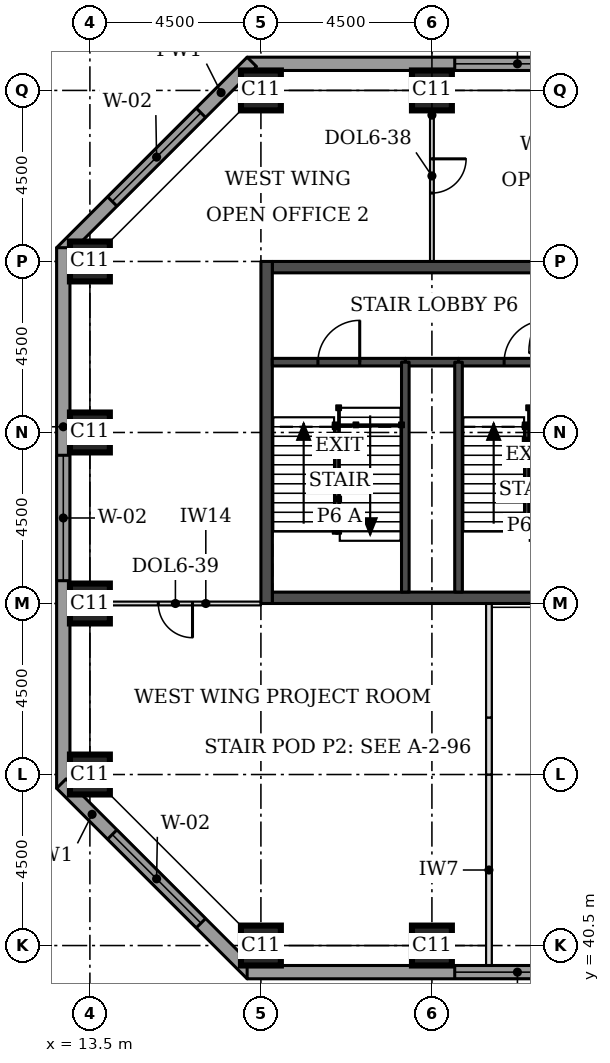
"""IFC4 building model, lengths in metres.
Left out: names, types, materials, properties, quantities, classifications, styles, units other than length and angle.
Written with IfcOpenShell. Run it as: python <this file> out.ifc"""

import sys

from ifc_helpers import new_model, si_unit, direction, frame, frame_2d, origin, origin_2d, place, context, subcontext, project, spatial, rectangle, extrude, element, fill, save


model = new_model("IFC4")
c1 = context("Model", 3, precision=1e-05, world=origin(), true_north=direction((0.0, 1.0)))
c2 = subcontext(c1, "Body", "Model", "MODEL_VIEW")
j1 = project(units=[si_unit("LENGTHUNIT", "METRE"), si_unit("PLANEANGLEUNIT", "RADIAN")], contexts=[c1])
p1 = place(None, origin())
s1 = spatial("IfcSite", under=j1, at=p1, CompositionType="ELEMENT")
p2 = place(p1, origin())
s2 = spatial("IfcBuilding", under=s1, at=p2, CompositionType="ELEMENT")
p3 = place(p2, frame((0.0, 0.0, 115.9)))
s3 = spatial("IfcBuildingStorey", under=s2, at=p3, CompositionType="ELEMENT", Elevation=115.9)
for number, where, z_axis, x_axis in (
    (1, (18.0, 40.5, 0.0), (0.0, 0.0, 1.0), (1.0, 0.0, 0.0)),
    (2, (22.5, 40.5, 0.0), (0.0, 0.0, 1.0), (1.0, 0.0, 0.0)),
    (3, (13.5, 45.0, 0.0), (0.0, 0.0, 1.0), (1.0, 0.0, 0.0)),
    (4, (13.5, 49.5, 0.0), (0.0, 0.0, 1.0), (1.0, 0.0, 0.0)),
    (5, (13.5, 54.0, 0.0), (0.0, 0.0, 1.0), (1.0, 0.0, 0.0)),
    (6, (13.5, 58.5, 0.0), (0.0, 0.0, 1.0), (1.0, 0.0, 0.0)),
    (7, (18.0, 63.0, 0.0), (0.0, 0.0, 1.0), (1.0, 0.0, 0.0)),
    (8, (22.5, 63.0, 0.0), (0.0, 0.0, 1.0), (1.0, 0.0, 0.0)),
):
    element("IfcColumn", number, at=place(p3, frame(where, z_axis=z_axis, x_axis=x_axis)), inside=s3, PredefinedType="COLUMN", context=c2, shape_type="SweptSolid", body=[
        extrude(rectangle(XDim=1.05, YDim=1.05, at=origin_2d()), origin(), (0.0, 0.0, 1.0), 3.7),
    ])
for number, where, z_axis, x_axis in (
    (9, (18.3, 49.65, 0.0), (0.0, 0.0, 1.0), (1.0, 0.0, 0.0)),
    (10, (18.3, 58.35, 0.0), (0.0, 0.0, 1.0), (1.0, 0.0, 0.0)),
):
    element("IfcWall", number, at=place(p3, frame(where, z_axis=z_axis, x_axis=x_axis)), inside=s3, PredefinedType="SHEAR", context=c2, shape_type="SweptSolid", body=[
        extrude(rectangle(XDim=8.4, YDim=0.3, at=frame_2d((4.2, 0.0))), origin(), (0.0, 0.0, 1.0), 3.7),
    ])
p4 = place(p3, frame((18.15, 49.5, 0.0), z_axis=(0.0, 0.0, 1.0), x_axis=(0.0, 1.0, 0.0)))
e11 = element("IfcWall", 11, at=p4, inside=s3, PredefinedType="SHEAR", context=c2, shape_type="SweptSolid", body=[
    extrude(rectangle(XDim=9.0, YDim=0.3, at=frame_2d((4.5, 0.0))), origin(), (0.0, 0.0, 1.0), 3.7),
])
p5 = place(p3, frame((35.475, 63.7, 0.0), z_axis=(0.0, 0.0, 1.0), x_axis=(-1.0, 0.0, 0.0)))
e12 = element("IfcWall", 12, at=p5, inside=s3, PredefinedType="STANDARD", context=c2, shape_type="SweptSolid", body=[
    extrude(rectangle(XDim=17.837, YDim=0.35, at=frame_2d((8.919, 0.0))), origin(), (0.0, 0.0, 1.0), 3.525),
])
p6 = place(p5, frame((0.5, 0.0, 0.9)))
e13 = element("IfcOpeningElement", 13, at=p6, cuts=e12, PredefinedType="OPENING", context=c2, shape_type="SweptSolid", body=[
    extrude(rectangle(XDim=3.3, YDim=1.9, at=frame_2d((1.65, 0.95))), frame((0.0, 0.185, 0.0), z_axis=(0.0, -1.0, 0.0), x_axis=(1.0, 0.0, 0.0)), (0.0, 0.0, 1.0), 0.37),
])
p7 = place(p5, frame((9.075, 0.0, 0.9)))
e14 = element("IfcOpeningElement", 14, at=p7, cuts=e12, PredefinedType="OPENING", context=c2, shape_type="SweptSolid", body=[
    extrude(rectangle(XDim=3.3, YDim=1.9, at=frame_2d((1.65, 0.95))), frame((0.0, 0.185, 0.0), z_axis=(0.0, -1.0, 0.0), x_axis=(1.0, 0.0, 0.0)), (0.0, 0.0, 1.0), 0.37),
])
p8 = place(p3, frame((17.761, 63.751, 0.0), z_axis=(0.0, 0.0, 1.0), x_axis=(-0.707106781187, -0.707106781187, 0.0)))
e15 = element("IfcWall", 15, at=p8, inside=s3, PredefinedType="STANDARD", context=c2, shape_type="SweptSolid", body=[
    extrude(rectangle(XDim=7.089, YDim=0.35, at=frame_2d((3.544, 0.0))), origin(), (0.0, 0.0, 1.0), 3.525),
])
p9 = place(p8, frame((1.894, 0.0, 0.9)))
e16 = element("IfcOpeningElement", 16, at=p9, cuts=e15, PredefinedType="OPENING", context=c2, shape_type="SweptSolid", body=[
    extrude(rectangle(XDim=3.3, YDim=1.9, at=frame_2d((1.65, 0.95))), frame((0.0, 0.185, 0.0), z_axis=(0.0, -1.0, 0.0), x_axis=(1.0, 0.0, 0.0)), (0.0, 0.0, 1.0), 0.37),
])
p10 = place(p3, frame((12.8, 58.862, 0.0), z_axis=(0.0, 0.0, 1.0), x_axis=(0.0, -1.0, 0.0)))
e17 = element("IfcWall", 17, at=p10, inside=s3, PredefinedType="STANDARD", context=c2, shape_type="SweptSolid", body=[
    extrude(rectangle(XDim=14.225, YDim=0.35, at=frame_2d((7.112, 0.0))), origin(), (0.0, 0.0, 1.0), 3.525),
])
p11 = place(p10, frame((5.462, 0.0, 0.9)))
e18 = element("IfcOpeningElement", 18, at=p11, cuts=e17, PredefinedType="OPENING", context=c2, shape_type="SweptSolid", body=[
    extrude(rectangle(XDim=3.3, YDim=1.9, at=frame_2d((1.65, 0.95))), frame((0.0, 0.185, 0.0), z_axis=(0.0, -1.0, 0.0), x_axis=(1.0, 0.0, 0.0)), (0.0, 0.0, 1.0), 0.37),
])
p12 = place(p3, frame((12.749, 44.761, 0.0), z_axis=(0.0, 0.0, 1.0), x_axis=(0.707106781187, -0.707106781187, 0.0)))
e19 = element("IfcWall", 19, at=p12, inside=s3, PredefinedType="STANDARD", context=c2, shape_type="SweptSolid", body=[
    extrude(rectangle(XDim=7.089, YDim=0.35, at=frame_2d((3.544, 0.0))), origin(), (0.0, 0.0, 1.0), 3.525),
])
p13 = place(p12, frame((1.894, 0.0, 0.9)))
e20 = element("IfcOpeningElement", 20, at=p13, cuts=e19, PredefinedType="OPENING", context=c2, shape_type="SweptSolid", body=[
    extrude(rectangle(XDim=3.3, YDim=1.9, at=frame_2d((1.65, 0.95))), frame((0.0, 0.185, 0.0), z_axis=(0.0, -1.0, 0.0), x_axis=(1.0, 0.0, 0.0)), (0.0, 0.0, 1.0), 0.37),
])
p14 = place(p3, frame((17.638, 39.8, 0.0), z_axis=(0.0, 0.0, 1.0), x_axis=(1.0, 0.0, 0.0)))
e21 = element("IfcWall", 21, at=p14, inside=s3, PredefinedType="STANDARD", context=c2, shape_type="SweptSolid", body=[
    extrude(rectangle(XDim=17.837, YDim=0.35, at=frame_2d((8.919, 0.0))), origin(), (0.0, 0.0, 1.0), 3.525),
])
p15 = place(p14, frame((5.462, 0.0, 0.9)))
e22 = element("IfcOpeningElement", 22, at=p15, cuts=e21, PredefinedType="OPENING", context=c2, shape_type="SweptSolid", body=[
    extrude(rectangle(XDim=3.3, YDim=1.9, at=frame_2d((1.65, 0.95))), frame((0.0, 0.185, 0.0), z_axis=(0.0, -1.0, 0.0), x_axis=(1.0, 0.0, 0.0)), (0.0, 0.0, 1.0), 0.37),
])
p16 = place(p14, frame((14.037, 0.0, 0.9)))
e23 = element("IfcOpeningElement", 23, at=p16, cuts=e21, PredefinedType="OPENING", context=c2, shape_type="SweptSolid", body=[
    extrude(rectangle(XDim=3.3, YDim=1.9, at=frame_2d((1.65, 0.95))), frame((0.0, 0.185, 0.0), z_axis=(0.0, -1.0, 0.0), x_axis=(1.0, 0.0, 0.0)), (0.0, 0.0, 1.0), 0.37),
])
p17 = place(p3, frame((24.0, 39.975, 0.0), z_axis=(0.0, 0.0, 1.0), x_axis=(0.0, 1.0, 0.0)))
e24 = element("IfcWall", 24, at=p17, inside=s3, PredefinedType="PARTITIONING", context=c2, shape_type="SweptSolid", body=[
    extrude(rectangle(XDim=5.025, YDim=0.15, at=frame_2d((2.512, 0.0))), origin(), (0.0, 0.0, 1.0), 3.55),
])
p18 = place(p3, frame((24.0, 45.0, 0.0), z_axis=(0.0, 0.0, 1.0), x_axis=(0.0, 1.0, 0.0)))
e25 = element("IfcWall", 25, at=p18, inside=s3, PredefinedType="PARTITIONING", context=c2, shape_type="SweptSolid", body=[
    extrude(rectangle(XDim=1.5, YDim=0.15, at=frame_2d((0.75, 0.0))), origin(), (0.0, 0.0, 1.0), 3.55),
])
p19 = place(p3, frame((24.0, 46.5, 0.0), z_axis=(0.0, 0.0, 1.0), x_axis=(0.0, 1.0, 0.0)))
e26 = element("IfcWall", 26, at=p19, inside=s3, PredefinedType="PARTITIONING", context=c2, shape_type="SweptSolid", body=[
    extrude(rectangle(XDim=3.0, YDim=0.15, at=frame_2d((1.5, 0.0))), origin(), (0.0, 0.0, 1.0), 3.55),
])
p20 = place(p3, frame((22.5, 63.0, 0.0), z_axis=(0.0, 0.0, 1.0), x_axis=(0.0, -1.0, 0.0)))
e27 = element("IfcWall", 27, at=p20, inside=s3, PredefinedType="PARTITIONING", context=c2, shape_type="SweptSolid", body=[
    extrude(rectangle(XDim=4.5, YDim=0.1, at=frame_2d((2.25, 0.0))), origin(), (0.0, 0.0, 1.0), 3.55),
])
p21 = place(p20, frame((1.8, 0.0, 0.0)))
e28 = element("IfcOpeningElement", 28, at=p21, cuts=e27, PredefinedType="OPENING", context=c2, shape_type="SweptSolid", body=[
    extrude(rectangle(XDim=0.9, YDim=2.1, at=frame_2d((0.45, 1.05))), frame((0.0, 0.06, 0.0), z_axis=(0.0, -1.0, 0.0), x_axis=(1.0, 0.0, 0.0)), (0.0, 0.0, 1.0), 0.12),
])
p22 = place(p3, frame((13.5, 49.5, 0.0), z_axis=(0.0, 0.0, 1.0), x_axis=(1.0, 0.0, 0.0)))
e29 = element("IfcWall", 29, at=p22, inside=s3, PredefinedType="PARTITIONING", context=c2, shape_type="SweptSolid", body=[
    extrude(rectangle(XDim=4.5, YDim=0.1, at=frame_2d((2.25, 0.0))), origin(), (0.0, 0.0, 1.0), 3.55),
])
p23 = place(p22, frame((1.8, 0.0, 0.0)))
e30 = element("IfcOpeningElement", 30, at=p23, cuts=e29, PredefinedType="OPENING", context=c2, shape_type="SweptSolid", body=[
    extrude(rectangle(XDim=0.9, YDim=2.1, at=frame_2d((0.45, 1.05))), frame((0.0, 0.06, 0.0), z_axis=(0.0, -1.0, 0.0), x_axis=(1.0, 0.0, 0.0)), (0.0, 0.0, 1.0), 0.12),
])
p24 = place(p3, frame((21.8, 55.85, 0.0), z_axis=(0.0, 0.0, 1.0), x_axis=(1.0, 0.0, 0.0)))
e31 = element("IfcWall", 31, at=p24, inside=s3, PredefinedType="SOLIDWALL", context=c2, shape_type="SweptSolid", body=[
    extrude(rectangle(XDim=1.4, YDim=0.2, at=frame_2d((0.7, 0.0))), origin(), (0.0, 0.0, 1.0), 3.55),
])
p25 = place(p3, frame((18.3, 55.85, 0.0), z_axis=(0.0, 0.0, 1.0), x_axis=(1.0, 0.0, 0.0)))
e32 = element("IfcWall", 32, at=p25, inside=s3, PredefinedType="SOLIDWALL", context=c2, shape_type="SweptSolid", body=[
    extrude(rectangle(XDim=3.5, YDim=0.2, at=frame_2d((1.75, 0.0))), origin(), (0.0, 0.0, 1.0), 3.55),
])
p26 = place(p25, frame((1.2, 0.0, 0.0)))
e33 = element("IfcOpeningElement", 33, at=p26, cuts=e32, PredefinedType="OPENING", context=c2, shape_type="SweptSolid", body=[
    extrude(rectangle(XDim=1.1, YDim=2.1, at=frame_2d((0.55, 1.05))), frame((0.0, 0.11, 0.0), z_axis=(0.0, -1.0, 0.0), x_axis=(1.0, 0.0, 0.0)), (0.0, 0.0, 1.0), 0.22),
])
p27 = place(p3, frame((23.2, 55.85, 0.0), z_axis=(0.0, 0.0, 1.0), x_axis=(1.0, 0.0, 0.0)))
e34 = element("IfcWall", 34, at=p27, inside=s3, PredefinedType="SOLIDWALL", context=c2, shape_type="SweptSolid", body=[
    extrude(rectangle(XDim=3.5, YDim=0.2, at=frame_2d((1.75, 0.0))), origin(), (0.0, 0.0, 1.0), 3.55),
])
p28 = place(p27, frame((1.2, 0.0, 0.0)))
e35 = element("IfcOpeningElement", 35, at=p28, cuts=e34, PredefinedType="OPENING", context=c2, shape_type="SweptSolid", body=[
    extrude(rectangle(XDim=1.1, YDim=2.1, at=frame_2d((0.55, 1.05))), frame((0.0, 0.11, 0.0), z_axis=(0.0, -1.0, 0.0), x_axis=(1.0, 0.0, 0.0)), (0.0, 0.0, 1.0), 0.22),
])
for number, where, z_axis, x_axis in (
    (36, (21.8, 49.8, 0.0), (0.0, 0.0, 1.0), (0.0, 1.0, 0.0)),
    (37, (23.2, 49.8, 0.0), (0.0, 0.0, 1.0), (0.0, 1.0, 0.0)),
):
    element("IfcWall", number, at=place(p3, frame(where, z_axis=z_axis, x_axis=x_axis)), inside=s3, PredefinedType="SOLIDWALL", context=c2, shape_type="SweptSolid", body=[
        extrude(rectangle(XDim=6.05, YDim=0.2, at=frame_2d((3.025, 0.0))), origin(), (0.0, 0.0, 1.0), 3.55),
    ])
p29 = place(p7, origin())
e38 = element("IfcWindow", 38, at=p29, inside=s3, PartitioningType="SINGLE_PANEL", PredefinedType="WINDOW", context=c2, shape_type="SweptSolid", body=[
    extrude(rectangle(XDim=3.3, YDim=1.9, at=frame_2d((1.65, 0.95))), frame((0.0, 0.085, 0.0), z_axis=(0.0, -1.0, 0.0), x_axis=(1.0, 0.0, 0.0)), (0.0, 0.0, 1.0), 0.06),
])
fill(e14, e38)
p30 = place(p9, origin())
e39 = element("IfcWindow", 39, at=p30, inside=s3, PartitioningType="SINGLE_PANEL", PredefinedType="WINDOW", context=c2, shape_type="SweptSolid", body=[
    extrude(rectangle(XDim=3.3, YDim=1.9, at=frame_2d((1.65, 0.95))), frame((0.0, 0.085, 0.0), z_axis=(0.0, -1.0, 0.0), x_axis=(1.0, 0.0, 0.0)), (0.0, 0.0, 1.0), 0.06),
])
fill(e16, e39)
p31 = place(p11, origin())
e40 = element("IfcWindow", 40, at=p31, inside=s3, PartitioningType="SINGLE_PANEL", PredefinedType="WINDOW", context=c2, shape_type="SweptSolid", body=[
    extrude(rectangle(XDim=3.3, YDim=1.9, at=frame_2d((1.65, 0.95))), frame((0.0, 0.085, 0.0), z_axis=(0.0, -1.0, 0.0), x_axis=(1.0, 0.0, 0.0)), (0.0, 0.0, 1.0), 0.06),
])
fill(e18, e40)
p32 = place(p13, origin())
e41 = element("IfcWindow", 41, at=p32, inside=s3, PartitioningType="SINGLE_PANEL", PredefinedType="WINDOW", context=c2, shape_type="SweptSolid", body=[
    extrude(rectangle(XDim=3.3, YDim=1.9, at=frame_2d((1.65, 0.95))), frame((0.0, 0.085, 0.0), z_axis=(0.0, -1.0, 0.0), x_axis=(1.0, 0.0, 0.0)), (0.0, 0.0, 1.0), 0.06),
])
fill(e20, e41)
p33 = place(p15, origin())
e42 = element("IfcWindow", 42, at=p33, inside=s3, PartitioningType="SINGLE_PANEL", PredefinedType="WINDOW", context=c2, shape_type="SweptSolid", body=[
    extrude(rectangle(XDim=3.3, YDim=1.9, at=frame_2d((1.65, 0.95))), frame((0.0, 0.085, 0.0), z_axis=(0.0, -1.0, 0.0), x_axis=(1.0, 0.0, 0.0)), (0.0, 0.0, 1.0), 0.06),
])
fill(e22, e42)
p34 = place(p21, origin())
e43 = element("IfcDoor", 43, at=p34, inside=s3, OperationType="SINGLE_SWING_LEFT", PredefinedType="DOOR", context=c2, shape_type="SweptSolid", body=[
    extrude(rectangle(XDim=0.9, YDim=2.1, at=frame_2d((0.45, 1.05))), frame((0.0, 0.025, 0.0), z_axis=(0.0, -1.0, 0.0), x_axis=(1.0, 0.0, 0.0)), (0.0, 0.0, 1.0), 0.05),
])
fill(e28, e43)
p35 = place(p23, frame((0.9, 0.0, 0.0), z_axis=(0.0, 0.0, 1.0), x_axis=(-1.0, 0.0, 0.0)))
e44 = element("IfcDoor", 44, at=p35, inside=s3, OperationType="SINGLE_SWING_LEFT", PredefinedType="DOOR", context=c2, shape_type="SweptSolid", body=[
    extrude(rectangle(XDim=0.9, YDim=2.1, at=frame_2d((0.45, 1.05))), frame((0.0, 0.025, 0.0), z_axis=(0.0, -1.0, 0.0), x_axis=(1.0, 0.0, 0.0)), (0.0, 0.0, 1.0), 0.05),
])
fill(e30, e44)
p36 = place(p26, origin())
e45 = element("IfcDoor", 45, at=p36, inside=s3, OperationType="SINGLE_SWING_RIGHT", PredefinedType="DOOR", context=c2, shape_type="SweptSolid", body=[
    extrude(rectangle(XDim=1.1, YDim=2.1, at=frame_2d((0.55, 1.05))), frame((0.0, 0.025, 0.0), z_axis=(0.0, -1.0, 0.0), x_axis=(1.0, 0.0, 0.0)), (0.0, 0.0, 1.0), 0.05),
])
fill(e33, e45)
p37 = place(p28, origin())
e46 = element("IfcDoor", 46, at=p37, inside=s3, OperationType="SINGLE_SWING_RIGHT", PredefinedType="DOOR", context=c2, shape_type="SweptSolid", body=[
    extrude(rectangle(XDim=1.1, YDim=2.1, at=frame_2d((0.55, 1.05))), frame((0.0, 0.025, 0.0), z_axis=(0.0, -1.0, 0.0), x_axis=(1.0, 0.0, 0.0)), (0.0, 0.0, 1.0), 0.05),
])
fill(e35, e46)
save(model, sys.argv[1])
